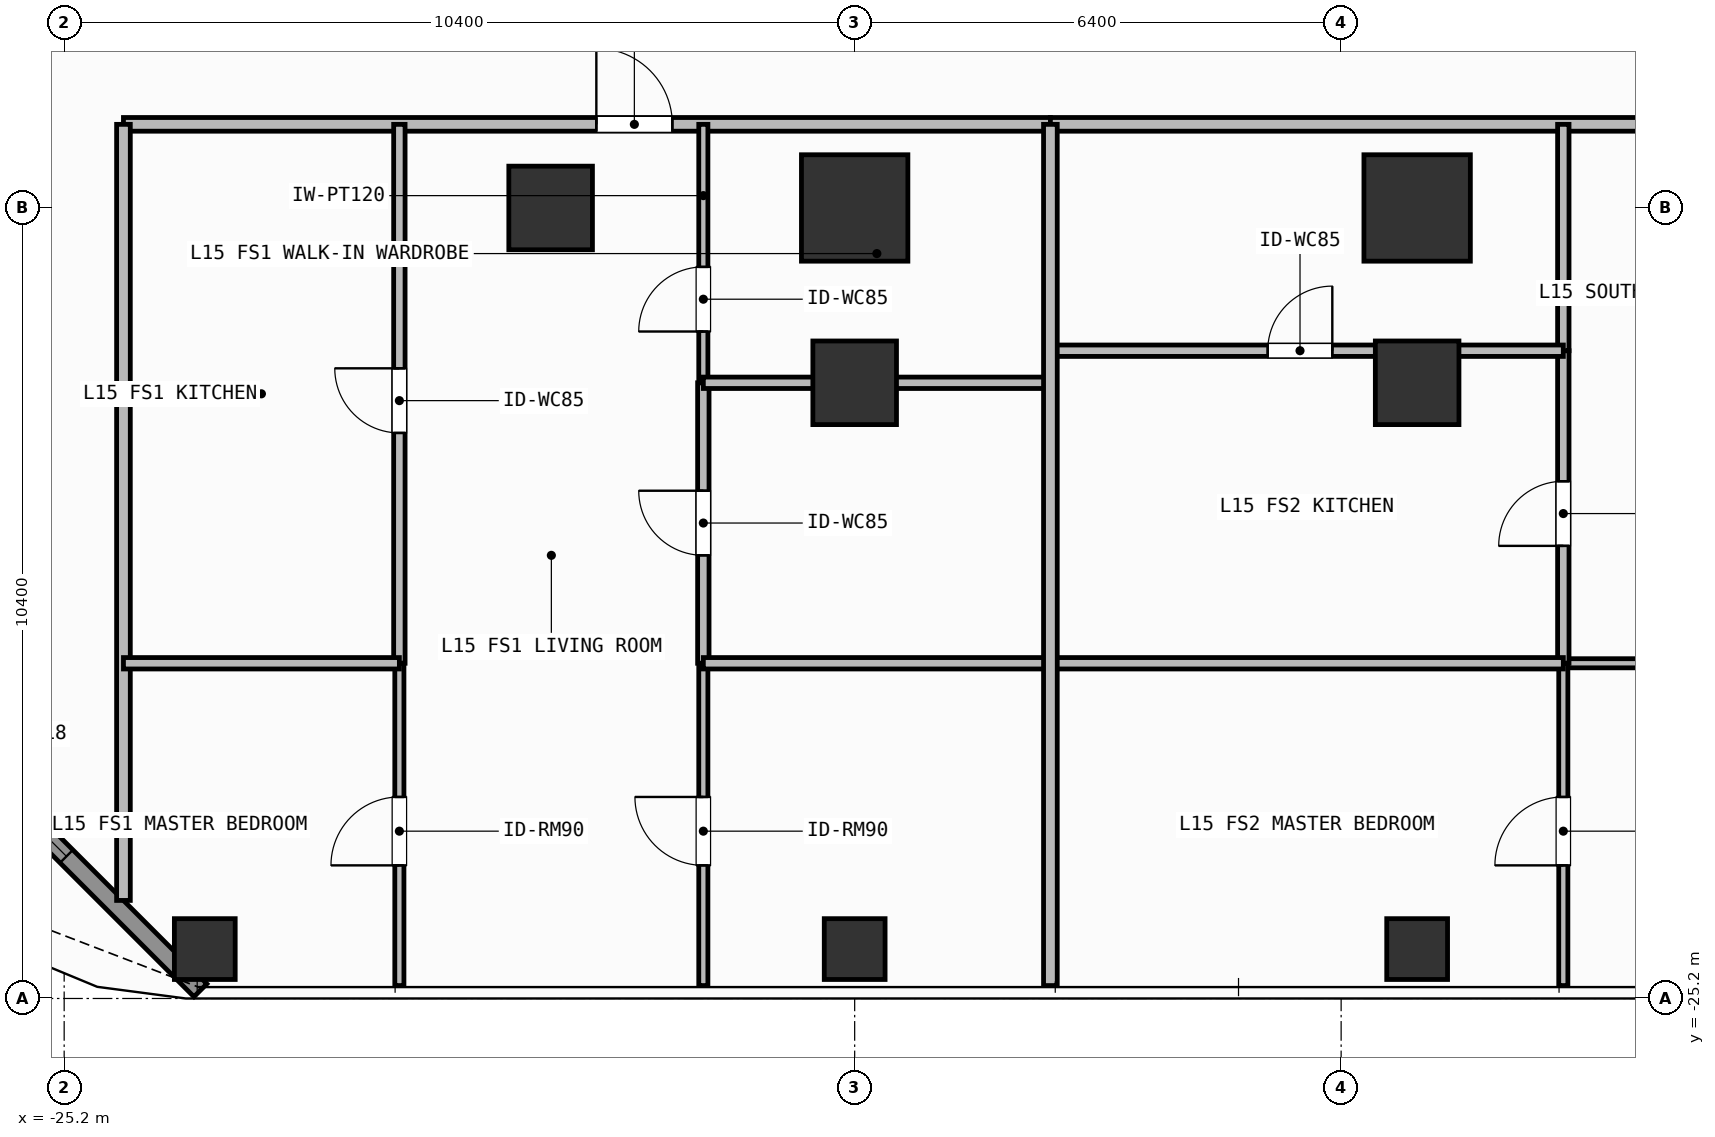
"""IFC4 building model, lengths in metres.
Left out: names, types, materials, properties, quantities, classifications, styles, units other than length and angle.
Written with IfcOpenShell. Run it as: python <this file> out.ifc"""

import sys

from ifc_helpers import new_model, si_unit, direction, frame, frame_2d, origin, origin_2d, place, context, subcontext, project, spatial, rectangle, hollow_rectangle, extrude, element, fill, save


model = new_model("IFC4")
c1 = context("Model", 3, precision=1e-05, world=origin(), true_north=direction((0.0, 1.0)))
c2 = subcontext(c1, "Body", "Model", "MODEL_VIEW")
j1 = project(units=[si_unit("LENGTHUNIT", "METRE"), si_unit("PLANEANGLEUNIT", "RADIAN")], contexts=[c1])
p1 = place(None, origin())
s1 = spatial("IfcSite", under=j1, at=p1, CompositionType="ELEMENT")
p2 = place(p1, origin())
s2 = spatial("IfcBuilding", under=s1, at=p2, CompositionType="ELEMENT")
p3 = place(p2, frame((0.0, 0.0, 57.9)))
s3 = spatial("IfcBuildingStorey", under=s2, at=p3, CompositionType="ELEMENT", Elevation=57.9)
for number, where, z_axis, x_axis in (
    (1, (-14.8, -14.8, 0.0), (0.0, 0.0, 1.0), (1.0, 0.0, 0.0)),
    (2, (-7.4, -14.8, 0.0), (0.0, 0.0, 1.0), (1.0, 0.0, 0.0)),
):
    element("IfcColumn", number, at=place(p3, frame(where, z_axis=z_axis, x_axis=x_axis)), inside=s3, PredefinedType="COLUMN", context=c2, shape_type="SweptSolid", body=[
        extrude(rectangle(XDim=1.4, YDim=1.4, at=origin_2d()), origin(), (0.0, 0.0, 1.0), 3.9),
    ])
for number, where, z_axis, x_axis in (
    (3, (-18.8, -14.8, 0.0), (0.0, 0.0, 1.0), (1.0, 0.0, 0.0)),
    (4, (-14.8, -17.1, 0.0), (0.0, 0.0, 1.0), (1.0, 0.0, 0.0)),
    (5, (-7.4, -17.1, 0.0), (0.0, 0.0, 1.0), (1.0, 0.0, 0.0)),
):
    element("IfcColumn", number, at=place(p3, frame(where, z_axis=z_axis, x_axis=x_axis)), inside=s3, PredefinedType="COLUMN", context=c2, shape_type="SweptSolid", body=[
        extrude(rectangle(XDim=1.1, YDim=1.1, at=origin_2d()), origin(), (0.0, 0.0, 1.0), 3.9),
    ])
for number, where, z_axis, x_axis in (
    (6, (-23.35, -24.55, 0.0), (0.0, 0.0, 1.0), (1.0, 0.0, 0.0)),
    (7, (-14.8, -24.55, 0.0), (0.0, 0.0, 1.0), (1.0, 0.0, 0.0)),
    (8, (-7.4, -24.55, 0.0), (0.0, 0.0, 1.0), (1.0, 0.0, 0.0)),
):
    element("IfcColumn", number, at=place(p3, frame(where, z_axis=z_axis, x_axis=x_axis)), inside=s3, PredefinedType="COLUMN", context=c2, shape_type="SweptSolid", body=[
        extrude(hollow_rectangle(XDim=0.8, YDim=0.8, WallThickness=0.036, at=origin_2d()), origin(), (0.0, 0.0, 1.0), 3.9),
    ])
p4 = place(p3, frame((-23.408, -25.092, 0.0), z_axis=(0.0, 0.0, 1.0), x_axis=(-0.707106781187, 0.707106781187, 0.0)))
e9 = element("IfcWall", 9, at=p4, inside=s3, PredefinedType="SOLIDWALL", context=c2, shape_type="SweptSolid", body=[
    extrude(rectangle(XDim=6.484, YDim=0.24, at=frame_2d((3.242, 0.0))), origin(), (0.0, 0.0, 1.0), 3.68),
])
p5 = place(p4, frame((2.492, 0.0, 0.8)))
e10 = element("IfcOpeningElement", 10, at=p5, cuts=e9, PredefinedType="OPENING", context=c2, shape_type="SweptSolid", body=[
    extrude(rectangle(XDim=1.5, YDim=1.85, at=frame_2d((0.75, 0.925))), frame((0.0, 0.13, 0.0), z_axis=(0.0, -1.0, 0.0), x_axis=(1.0, 0.0, 0.0)), (0.0, 0.0, 1.0), 0.26),
])
p6 = place(p3, frame((-24.42, -13.7, 0.0), z_axis=(0.0, 0.0, 1.0), x_axis=(1.0, 0.0, 0.0)))
e11 = element("IfcWall", 11, at=p6, inside=s3, PredefinedType="PARTITIONING", context=c2, shape_type="SweptSolid", body=[
    extrude(rectangle(XDim=12.195, YDim=0.18, at=frame_2d((6.097, 0.0))), origin(), (0.0, 0.0, 1.0), 3.68),
])
p7 = place(p6, frame((6.221, 0.0, 0.0)))
e12 = element("IfcOpeningElement", 12, at=p7, cuts=e11, PredefinedType="OPENING", context=c2, shape_type="SweptSolid", body=[
    extrude(rectangle(XDim=1.0, YDim=2.2, at=frame_2d((0.5, 1.1))), frame((0.0, 0.1, 0.0), z_axis=(0.0, -1.0, 0.0), x_axis=(1.0, 0.0, 0.0)), (0.0, 0.0, 1.0), 0.2),
])
p8 = place(p3, frame((-20.79, -20.79, 0.0), z_axis=(0.0, 0.0, 1.0), x_axis=(0.0, 1.0, 0.0)))
e13 = element("IfcWall", 13, at=p8, inside=s3, PredefinedType="PARTITIONING", context=c2, shape_type="SweptSolid", body=[
    extrude(rectangle(XDim=7.09, YDim=0.15, at=frame_2d((3.545, 0.0))), origin(), (0.0, 0.0, 1.0), 3.68),
])
p9 = place(p8, frame((3.03, 0.0, 0.0)))
e14 = element("IfcOpeningElement", 14, at=p9, cuts=e13, PredefinedType="OPENING", context=c2, shape_type="SweptSolid", body=[
    extrude(rectangle(XDim=0.85, YDim=2.1, at=frame_2d((0.425, 1.05))), frame((0.0, 0.085, 0.0), z_axis=(0.0, -1.0, 0.0), x_axis=(1.0, 0.0, 0.0)), (0.0, 0.0, 1.0), 0.17),
])
p10 = place(p3, frame((-20.79, -25.03, 0.0), z_axis=(0.0, 0.0, 1.0), x_axis=(0.0, 1.0, 0.0)))
e15 = element("IfcWall", 15, at=p10, inside=s3, PredefinedType="PARTITIONING", context=c2, shape_type="SweptSolid", body=[
    extrude(rectangle(XDim=4.24, YDim=0.12, at=frame_2d((2.12, 0.0))), origin(), (0.0, 0.0, 1.0), 3.68),
])
p11 = place(p10, frame((1.581, 0.0, 0.0)))
e16 = element("IfcOpeningElement", 16, at=p11, cuts=e15, PredefinedType="OPENING", context=c2, shape_type="SweptSolid", body=[
    extrude(rectangle(XDim=0.9, YDim=2.1, at=frame_2d((0.45, 1.05))), frame((0.0, 0.07, 0.0), z_axis=(0.0, -1.0, 0.0), x_axis=(1.0, 0.0, 0.0)), (0.0, 0.0, 1.0), 0.14),
])
p12 = place(p3, frame((-16.791, -20.79, 0.0), z_axis=(0.0, 0.0, 1.0), x_axis=(0.0, 1.0, 0.0)))
e17 = element("IfcWall", 17, at=p12, inside=s3, PredefinedType="PARTITIONING", context=c2, shape_type="SweptSolid", body=[
    extrude(rectangle(XDim=3.69, YDim=0.15, at=frame_2d((1.845, 0.0))), origin(), (0.0, 0.0, 1.0), 3.68),
])
p13 = place(p12, frame((1.42, 0.0, 0.0)))
e18 = element("IfcOpeningElement", 18, at=p13, cuts=e17, PredefinedType="OPENING", context=c2, shape_type="SweptSolid", body=[
    extrude(rectangle(XDim=0.85, YDim=2.1, at=frame_2d((0.425, 1.05))), frame((0.0, 0.085, 0.0), z_axis=(0.0, -1.0, 0.0), x_axis=(1.0, 0.0, 0.0)), (0.0, 0.0, 1.0), 0.17),
])
p14 = place(p3, frame((-16.791, -17.1, 0.0), z_axis=(0.0, 0.0, 1.0), x_axis=(0.0, 1.0, 0.0)))
e19 = element("IfcWall", 19, at=p14, inside=s3, PredefinedType="PARTITIONING", context=c2, shape_type="SweptSolid", body=[
    extrude(rectangle(XDim=3.4, YDim=0.12, at=frame_2d((1.7, 0.0))), origin(), (0.0, 0.0, 1.0), 3.68),
])
p15 = place(p14, frame((0.675, 0.0, 0.0)))
e20 = element("IfcOpeningElement", 20, at=p15, cuts=e19, PredefinedType="OPENING", context=c2, shape_type="SweptSolid", body=[
    extrude(rectangle(XDim=0.85, YDim=2.1, at=frame_2d((0.425, 1.05))), frame((0.0, 0.07, 0.0), z_axis=(0.0, -1.0, 0.0), x_axis=(1.0, 0.0, 0.0)), (0.0, 0.0, 1.0), 0.14),
])
p16 = place(p3, frame((-16.791, -25.03, 0.0), z_axis=(0.0, 0.0, 1.0), x_axis=(0.0, 1.0, 0.0)))
e21 = element("IfcWall", 21, at=p16, inside=s3, PredefinedType="PARTITIONING", context=c2, shape_type="SweptSolid", body=[
    extrude(rectangle(XDim=4.24, YDim=0.12, at=frame_2d((2.12, 0.0))), origin(), (0.0, 0.0, 1.0), 3.68),
])
p17 = place(p16, frame((1.581, 0.0, 0.0)))
e22 = element("IfcOpeningElement", 22, at=p17, cuts=e21, PredefinedType="OPENING", context=c2, shape_type="SweptSolid", body=[
    extrude(rectangle(XDim=0.9, YDim=2.1, at=frame_2d((0.45, 1.05))), frame((0.0, 0.07, 0.0), z_axis=(0.0, -1.0, 0.0), x_axis=(1.0, 0.0, 0.0)), (0.0, 0.0, 1.0), 0.14),
])
p18 = place(p3, frame((-12.225, -13.7, 0.0), z_axis=(0.0, 0.0, 1.0), x_axis=(1.0, 0.0, 0.0)))
e23 = element("IfcWall", 23, at=p18, inside=s3, PredefinedType="PARTITIONING", context=c2, shape_type="SweptSolid", body=[
    extrude(rectangle(XDim=17.467, YDim=0.18, at=frame_2d((8.733, 0.0))), origin(), (0.0, 0.0, 1.0), 3.68),
])
p19 = place(p18, frame((9.848, 0.0, 0.0)))
e24 = element("IfcOpeningElement", 24, at=p19, cuts=e23, PredefinedType="OPENING", context=c2, shape_type="SweptSolid", body=[
    extrude(rectangle(XDim=1.0, YDim=2.2, at=frame_2d((0.5, 1.1))), frame((0.0, 0.1, 0.0), z_axis=(0.0, -1.0, 0.0), x_axis=(1.0, 0.0, 0.0)), (0.0, 0.0, 1.0), 0.2),
])
p20 = place(p3, frame((-5.477, -20.79, 0.0), z_axis=(0.0, 0.0, 1.0), x_axis=(1.0, 0.0, 0.0)))
e25 = element("IfcWall", 25, at=p20, inside=s3, PredefinedType="PARTITIONING", context=c2, shape_type="SweptSolid", body=[
    extrude(rectangle(XDim=7.471, YDim=0.12, at=frame_2d((3.735, 0.0))), origin(), (0.0, 0.0, 1.0), 3.68),
])
p21 = place(p20, frame((3.375, 0.0, 0.0)))
e26 = element("IfcOpeningElement", 26, at=p21, cuts=e25, PredefinedType="OPENING", context=c2, shape_type="SweptSolid", body=[
    extrude(rectangle(XDim=0.9, YDim=2.1, at=frame_2d((0.45, 1.05))), frame((0.0, 0.07, 0.0), z_axis=(0.0, -1.0, 0.0), x_axis=(1.0, 0.0, 0.0)), (0.0, 0.0, 1.0), 0.14),
])
p22 = place(p3, frame((-5.477, -20.79, 0.0), z_axis=(0.0, 0.0, 1.0), x_axis=(0.0, 1.0, 0.0)))
e27 = element("IfcWall", 27, at=p22, inside=s3, PredefinedType="PARTITIONING", context=c2, shape_type="SweptSolid", body=[
    extrude(rectangle(XDim=4.112, YDim=0.15, at=frame_2d((2.056, 0.0))), origin(), (0.0, 0.0, 1.0), 3.68),
])
p23 = place(p22, frame((1.544, 0.0, 0.0)))
e28 = element("IfcOpeningElement", 28, at=p23, cuts=e27, PredefinedType="OPENING", context=c2, shape_type="SweptSolid", body=[
    extrude(rectangle(XDim=0.85, YDim=2.1, at=frame_2d((0.425, 1.05))), frame((0.0, 0.085, 0.0), z_axis=(0.0, -1.0, 0.0), x_axis=(1.0, 0.0, 0.0)), (0.0, 0.0, 1.0), 0.17),
])
p24 = place(p3, frame((-5.477, -16.678, 0.0), z_axis=(0.0, 0.0, 1.0), x_axis=(0.0, 1.0, 0.0)))
e29 = element("IfcWall", 29, at=p24, inside=s3, PredefinedType="PARTITIONING", context=c2, shape_type="SweptSolid", body=[
    extrude(rectangle(XDim=2.978, YDim=0.15, at=frame_2d((1.489, 0.0))), origin(), (0.0, 0.0, 1.0), 3.68),
])
p25 = place(p3, frame((-5.477, -25.03, 0.0), z_axis=(0.0, 0.0, 1.0), x_axis=(0.0, 1.0, 0.0)))
e30 = element("IfcWall", 30, at=p25, inside=s3, PredefinedType="PARTITIONING", context=c2, shape_type="SweptSolid", body=[
    extrude(rectangle(XDim=4.24, YDim=0.12, at=frame_2d((2.12, 0.0))), origin(), (0.0, 0.0, 1.0), 3.68),
])
p26 = place(p25, frame((1.581, 0.0, 0.0)))
e31 = element("IfcOpeningElement", 31, at=p26, cuts=e30, PredefinedType="OPENING", context=c2, shape_type="SweptSolid", body=[
    extrude(rectangle(XDim=0.9, YDim=2.1, at=frame_2d((0.45, 1.05))), frame((0.0, 0.07, 0.0), z_axis=(0.0, -1.0, 0.0), x_axis=(1.0, 0.0, 0.0)), (0.0, 0.0, 1.0), 0.14),
])
p27 = place(p3, frame((-24.42, -23.91, 0.0), z_axis=(0.0, 0.0, 1.0), x_axis=(0.0, 1.0, 0.0)))
e32 = element("IfcWall", 32, at=p27, inside=s3, PredefinedType="PARTITIONING", context=c2, shape_type="SweptSolid", body=[
    extrude(rectangle(XDim=10.21, YDim=0.18, at=frame_2d((5.105, 0.0))), origin(), (0.0, 0.0, 1.0), 3.68),
])
p28 = place(p3, frame((-24.42, -20.79, 0.0), z_axis=(0.0, 0.0, 1.0), x_axis=(1.0, 0.0, 0.0)))
e33 = element("IfcWall", 33, at=p28, inside=s3, PredefinedType="PARTITIONING", context=c2, shape_type="SweptSolid", body=[
    extrude(rectangle(XDim=3.63, YDim=0.15, at=frame_2d((1.815, 0.0))), origin(), (0.0, 0.0, 1.0), 3.68),
])
p29 = place(p3, frame((-16.791, -17.1, 0.0), z_axis=(0.0, 0.0, 1.0), x_axis=(1.0, 0.0, 0.0)))
e34 = element("IfcWall", 34, at=p29, inside=s3, PredefinedType="PARTITIONING", context=c2, shape_type="SweptSolid", body=[
    extrude(rectangle(XDim=4.566, YDim=0.15, at=frame_2d((2.283, 0.0))), origin(), (0.0, 0.0, 1.0), 3.082),
])
p30 = place(p3, frame((-16.791, -20.79, 0.0), z_axis=(0.0, 0.0, 1.0), x_axis=(1.0, 0.0, 0.0)))
e35 = element("IfcWall", 35, at=p30, inside=s3, PredefinedType="PARTITIONING", context=c2, shape_type="SweptSolid", body=[
    extrude(rectangle(XDim=4.566, YDim=0.15, at=frame_2d((2.283, 0.0))), origin(), (0.0, 0.0, 1.0), 3.68),
])
p31 = place(p3, frame((-12.225, -16.678, 0.0), z_axis=(0.0, 0.0, 1.0), x_axis=(1.0, 0.0, 0.0)))
e36 = element("IfcWall", 36, at=p31, inside=s3, PredefinedType="PARTITIONING", context=c2, shape_type="SweptSolid", body=[
    extrude(rectangle(XDim=6.748, YDim=0.15, at=frame_2d((3.374, 0.0))), origin(), (0.0, 0.0, 1.0), 3.68),
])
p32 = place(p31, frame((2.859, 0.0, 0.0)))
e37 = element("IfcOpeningElement", 37, at=p32, cuts=e36, PredefinedType="OPENING", context=c2, shape_type="SweptSolid", body=[
    extrude(rectangle(XDim=0.85, YDim=2.1, at=frame_2d((0.425, 1.05))), frame((0.0, 0.085, 0.0), z_axis=(0.0, -1.0, 0.0), x_axis=(1.0, 0.0, 0.0)), (0.0, 0.0, 1.0), 0.17),
])
p33 = place(p3, frame((-12.225, -20.79, 0.0), z_axis=(0.0, 0.0, 1.0), x_axis=(1.0, 0.0, 0.0)))
e38 = element("IfcWall", 38, at=p33, inside=s3, PredefinedType="PARTITIONING", context=c2, shape_type="SweptSolid", body=[
    extrude(rectangle(XDim=6.748, YDim=0.15, at=frame_2d((3.374, 0.0))), origin(), (0.0, 0.0, 1.0), 3.68),
])
p34 = place(p3, frame((-12.225, -25.03, 0.0), z_axis=(0.0, 0.0, 1.0), x_axis=(0.0, 1.0, 0.0)))
e39 = element("IfcWall", 39, at=p34, inside=s3, PredefinedType="PARTITIONING", context=c2, shape_type="SweptSolid", body=[
    extrude(rectangle(XDim=11.33, YDim=0.18, at=frame_2d((5.665, 0.0))), origin(), (0.0, 0.0, 1.0), 3.68),
])
p35 = place(p5, origin())
e40 = element("IfcWindow", 40, at=p35, inside=s3, PartitioningType="SINGLE_PANEL", PredefinedType="WINDOW", context=c2, shape_type="SweptSolid", body=[
    extrude(rectangle(XDim=1.5, YDim=1.85, at=frame_2d((0.75, 0.925))), frame((0.0, 0.03, 0.0), z_axis=(0.0, -1.0, 0.0), x_axis=(1.0, 0.0, 0.0)), (0.0, 0.0, 1.0), 0.06),
])
fill(e10, e40)
p36 = place(p7, origin())
e41 = element("IfcDoor", 41, at=p36, inside=s3, OperationType="SINGLE_SWING_LEFT", PredefinedType="DOOR", context=c2, shape_type="SweptSolid", body=[
    extrude(rectangle(XDim=1.0, YDim=2.2, at=frame_2d((0.5, 1.1))), frame((0.0, 0.025, 0.0), z_axis=(0.0, -1.0, 0.0), x_axis=(1.0, 0.0, 0.0)), (0.0, 0.0, 1.0), 0.05),
])
fill(e12, e41)
p37 = place(p9, origin())
e42 = element("IfcDoor", 42, at=p37, inside=s3, OperationType="SINGLE_SWING_RIGHT", PredefinedType="DOOR", context=c2, shape_type="SweptSolid", body=[
    extrude(rectangle(XDim=0.85, YDim=2.1, at=frame_2d((0.425, 1.05))), frame((0.0, 0.025, 0.0), z_axis=(0.0, -1.0, 0.0), x_axis=(1.0, 0.0, 0.0)), (0.0, 0.0, 1.0), 0.05),
])
fill(e14, e42)
p38 = place(p11, origin())
e43 = element("IfcDoor", 43, at=p38, inside=s3, OperationType="SINGLE_SWING_LEFT", PredefinedType="DOOR", context=c2, shape_type="SweptSolid", body=[
    extrude(rectangle(XDim=0.9, YDim=2.1, at=frame_2d((0.45, 1.05))), frame((0.0, 0.025, 0.0), z_axis=(0.0, -1.0, 0.0), x_axis=(1.0, 0.0, 0.0)), (0.0, 0.0, 1.0), 0.05),
])
fill(e16, e43)
p39 = place(p13, origin())
e44 = element("IfcDoor", 44, at=p39, inside=s3, OperationType="SINGLE_SWING_RIGHT", PredefinedType="DOOR", context=c2, shape_type="SweptSolid", body=[
    extrude(rectangle(XDim=0.85, YDim=2.1, at=frame_2d((0.425, 1.05))), frame((0.0, 0.025, 0.0), z_axis=(0.0, -1.0, 0.0), x_axis=(1.0, 0.0, 0.0)), (0.0, 0.0, 1.0), 0.05),
])
fill(e18, e44)
p40 = place(p15, origin())
e45 = element("IfcDoor", 45, at=p40, inside=s3, OperationType="SINGLE_SWING_LEFT", PredefinedType="DOOR", context=c2, shape_type="SweptSolid", body=[
    extrude(rectangle(XDim=0.85, YDim=2.1, at=frame_2d((0.425, 1.05))), frame((0.0, 0.025, 0.0), z_axis=(0.0, -1.0, 0.0), x_axis=(1.0, 0.0, 0.0)), (0.0, 0.0, 1.0), 0.05),
])
fill(e20, e45)
p41 = place(p17, origin())
e46 = element("IfcDoor", 46, at=p41, inside=s3, OperationType="SINGLE_SWING_RIGHT", PredefinedType="DOOR", context=c2, shape_type="SweptSolid", body=[
    extrude(rectangle(XDim=0.9, YDim=2.1, at=frame_2d((0.45, 1.05))), frame((0.0, 0.025, 0.0), z_axis=(0.0, -1.0, 0.0), x_axis=(1.0, 0.0, 0.0)), (0.0, 0.0, 1.0), 0.05),
])
fill(e22, e46)
p42 = place(p23, origin())
e47 = element("IfcDoor", 47, at=p42, inside=s3, OperationType="SINGLE_SWING_LEFT", PredefinedType="DOOR", context=c2, shape_type="SweptSolid", body=[
    extrude(rectangle(XDim=0.85, YDim=2.1, at=frame_2d((0.425, 1.05))), frame((0.0, 0.025, 0.0), z_axis=(0.0, -1.0, 0.0), x_axis=(1.0, 0.0, 0.0)), (0.0, 0.0, 1.0), 0.05),
])
fill(e28, e47)
p43 = place(p32, origin())
e48 = element("IfcDoor", 48, at=p43, inside=s3, OperationType="SINGLE_SWING_RIGHT", PredefinedType="DOOR", context=c2, shape_type="SweptSolid", body=[
    extrude(rectangle(XDim=0.85, YDim=2.1, at=frame_2d((0.425, 1.05))), frame((0.0, 0.025, 0.0), z_axis=(0.0, -1.0, 0.0), x_axis=(1.0, 0.0, 0.0)), (0.0, 0.0, 1.0), 0.05),
])
fill(e37, e48)
p44 = place(p26, origin())
e49 = element("IfcDoor", 49, at=p44, inside=s3, OperationType="SINGLE_SWING_LEFT", PredefinedType="DOOR", context=c2, shape_type="SweptSolid", body=[
    extrude(rectangle(XDim=0.9, YDim=2.1, at=frame_2d((0.45, 1.05))), frame((0.0, 0.025, 0.0), z_axis=(0.0, -1.0, 0.0), x_axis=(1.0, 0.0, 0.0)), (0.0, 0.0, 1.0), 0.05),
])
fill(e31, e49)
save(model, sys.argv[1])
